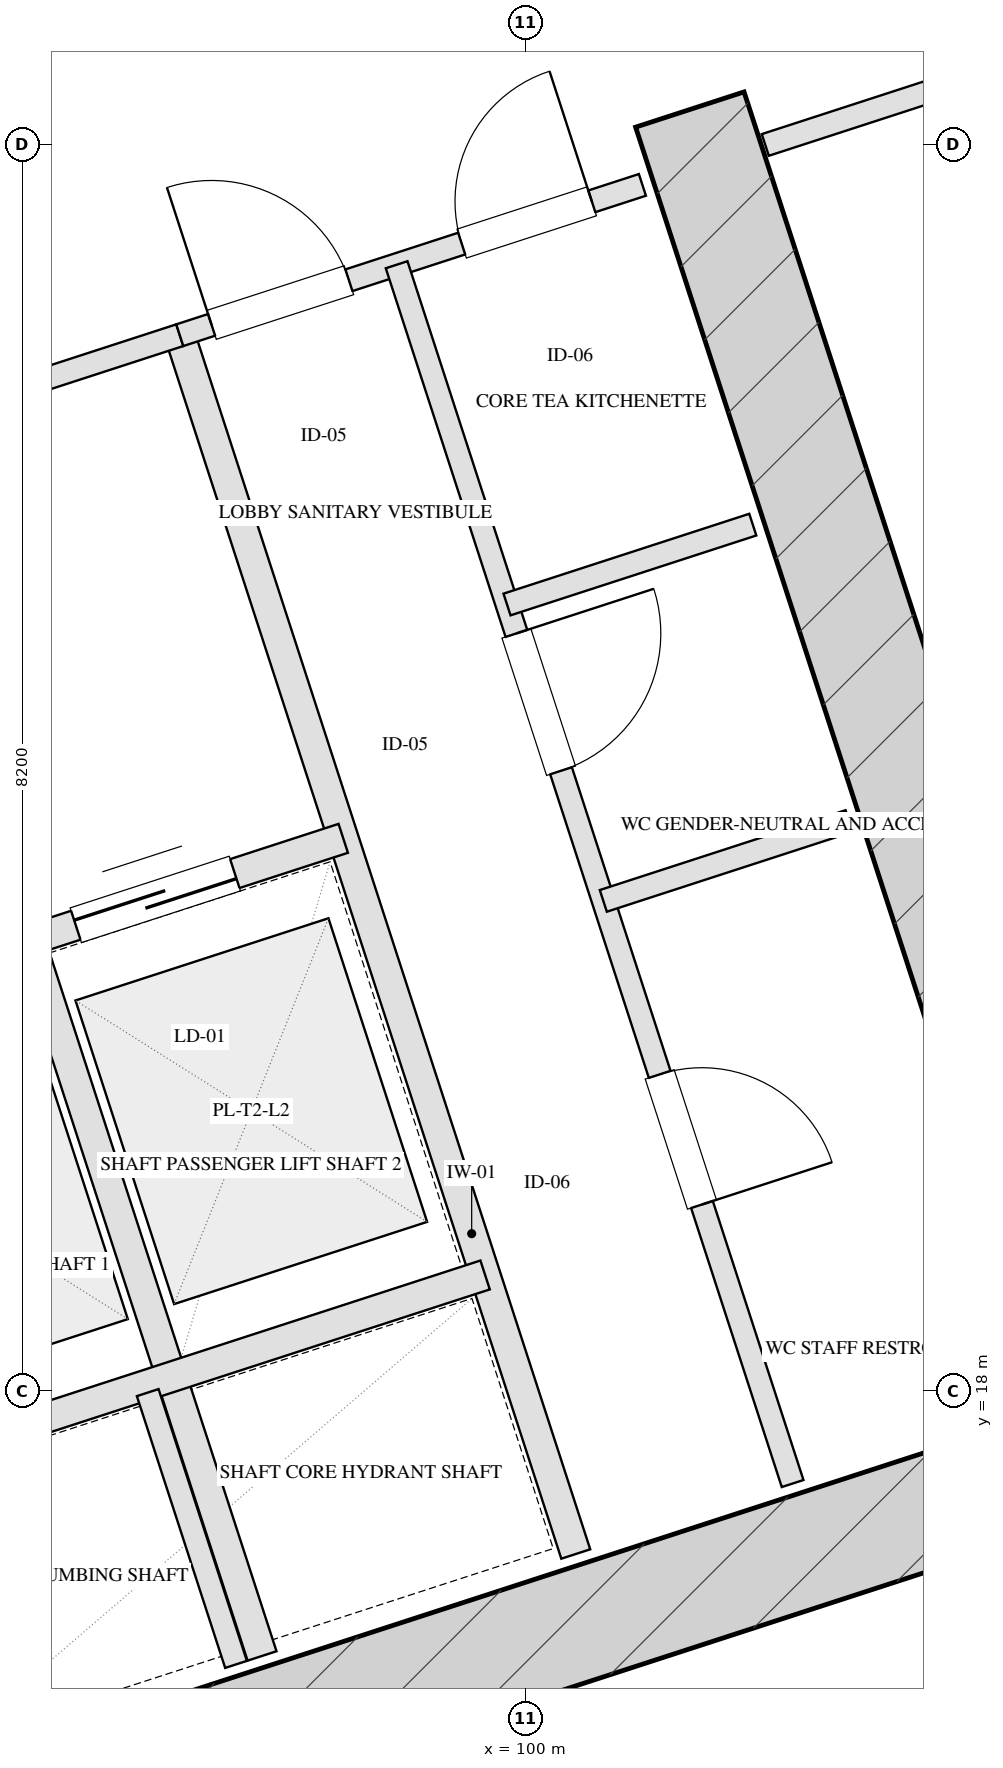
"""IFC4 building model, lengths in metres.
Left out: names, types, materials, properties, quantities, classifications, styles, units other than length and angle.
Written with IfcOpenShell. Run it as: python <this file> out.ifc"""

import sys

from ifc_helpers import new_model, si_unit, direction, frame, frame_2d, origin, place, context, subcontext, project, spatial, rectangle, extrude, element, fill, save


model = new_model("IFC4")
c1 = context("Model", 3, precision=1e-05, world=origin(), true_north=direction((0.0, 1.0)))
c2 = subcontext(c1, "Body", "Model", "MODEL_VIEW")
j1 = project(units=[si_unit("LENGTHUNIT", "METRE"), si_unit("PLANEANGLEUNIT", "RADIAN")], contexts=[c1])
p1 = place(None, origin())
s1 = spatial("IfcSite", under=j1, at=p1, CompositionType="ELEMENT")
p2 = place(p1, origin())
s2 = spatial("IfcBuilding", under=s1, at=p2, CompositionType="ELEMENT")
p3 = place(p2, frame((0.0, 0.0, 26.0)))
s3 = spatial("IfcBuildingStorey", under=s2, at=p3, CompositionType="ELEMENT", Elevation=26.0)
p4 = place(p3, frame((88.559, 12.629, 0.0), z_axis=(0.0, 0.0, 1.0), x_axis=(0.951056072937, 0.309018358888, 0.0)))
e1 = element("IfcWall", 1, at=p4, inside=s3, PredefinedType="SHEAR", context=c2, shape_type="SweptSolid", body=[
    extrude(rectangle(XDim=16.55, YDim=0.75, at=frame_2d((8.275, 0.0))), origin(), (0.0, 0.0, 1.0), 4.0),
])
p5 = place(p3, frame((101.082, 26.429, 0.0), z_axis=(0.0, 0.0, 1.0), x_axis=(0.309016134813, -0.951056795583, 0.0)))
e2 = element("IfcWall", 2, at=p5, inside=s3, PredefinedType="SHEAR", context=c2, shape_type="SweptSolid", body=[
    extrude(rectangle(XDim=9.63, YDim=0.75, at=frame_2d((4.815, 0.0))), origin(), (0.0, 0.0, 1.0), 4.0),
])
p6 = place(p3, frame((100.345, 63.648, 0.0), z_axis=(0.0, 0.0, 1.0), x_axis=(0.309014526607, -0.951057318118, 0.0)))
e3 = element("IfcWall", 3, at=p6, inside=s3, PredefinedType="SOLIDWALL", context=c2, shape_type="SweptSolid", body=[
    extrude(rectangle(XDim=50.0, YDim=0.4, at=frame_2d((25.0, 0.0))), origin(), (0.0, 0.0, 1.0), 3.16),
])
p7 = place(p6, frame((30.15, 0.0, 0.75)))
e4 = element("IfcOpeningElement", 4, at=p7, cuts=e3, PredefinedType="OPENING", context=c2, shape_type="SweptSolid", body=[
    extrude(rectangle(XDim=2.5, YDim=1.75, at=frame_2d((1.25, 0.875))), frame((0.0, 0.21, 0.0), z_axis=(0.0, -1.0, 0.0), x_axis=(1.0, 0.0, 0.0)), (0.0, 0.0, 1.0), 0.42),
])
p8 = place(p6, frame((21.15, 0.0, 0.75)))
e5 = element("IfcOpeningElement", 5, at=p8, cuts=e3, PredefinedType="OPENING", context=c2, shape_type="SweptSolid", body=[
    extrude(rectangle(XDim=2.5, YDim=1.75, at=frame_2d((1.25, 0.875))), frame((0.0, 0.21, 0.0), z_axis=(0.0, -1.0, 0.0), x_axis=(1.0, 0.0, 0.0)), (0.0, 0.0, 1.0), 0.42),
])
p9 = place(p3, frame((97.727, 24.944, 0.0), z_axis=(0.0, 0.0, 1.0), x_axis=(0.309016001439, -0.951056838919, 0.0)))
e6 = element("IfcWall", 6, at=p9, inside=s3, PredefinedType="PARTITIONING", context=c2, shape_type="SweptSolid", body=[
    extrude(rectangle(XDim=8.43, YDim=0.2, at=frame_2d((4.215, 0.0))), origin(), (0.0, 0.0, 1.0), 3.725),
])
p10 = place(p3, frame((93.542, 23.585, 0.0), z_axis=(0.0, 0.0, 1.0), x_axis=(0.951063829732, 0.308994485023, 0.0)))
e7 = element("IfcWall", 7, at=p10, inside=s3, PredefinedType="PARTITIONING", context=c2, shape_type="SweptSolid", body=[
    extrude(rectangle(XDim=4.4, YDim=0.15, at=frame_2d((2.2, 0.0))), origin(), (0.0, 0.0, 1.0), 3.725),
])
p11 = place(p10, frame((1.45, 0.0, 0.0)))
e8 = element("IfcOpeningElement", 8, at=p11, cuts=e7, PredefinedType="OPENING", context=c2, shape_type="SweptSolid", body=[
    extrude(rectangle(XDim=1.5, YDim=2.05, at=frame_2d((0.75, 1.025))), frame((0.0, 0.085, 0.0), z_axis=(0.0, -1.0, 0.0), x_axis=(1.0, 0.0, 0.0)), (0.0, 0.0, 1.0), 0.17),
])
p12 = place(p3, frame((94.617, 20.275, 0.0), z_axis=(0.0, 0.0, 1.0), x_axis=(0.951058531764, 0.30901079133, 0.0)))
e9 = element("IfcWall", 9, at=p12, inside=s3, PredefinedType="PARTITIONING", context=c2, shape_type="SweptSolid", body=[
    extrude(rectangle(XDim=4.4, YDim=0.2, at=frame_2d((2.2, 0.0))), origin(), (0.0, 0.0, 1.0), 3.725),
])
p13 = place(p12, frame((0.45, 0.0, 0.0)))
e10 = element("IfcOpeningElement", 10, at=p13, cuts=e9, PredefinedType="OPENING", context=c2, shape_type="SweptSolid", body=[
    extrude(rectangle(XDim=1.1, YDim=2.05, at=frame_2d((0.55, 1.025))), frame((0.0, 0.11, 0.0), z_axis=(0.0, -1.0, 0.0), x_axis=(1.0, 0.0, 0.0)), (0.0, 0.0, 1.0), 0.22),
])
p14 = place(p12, frame((2.55, 0.0, 0.0)))
e11 = element("IfcOpeningElement", 11, at=p14, cuts=e9, PredefinedType="OPENING", context=c2, shape_type="SweptSolid", body=[
    extrude(rectangle(XDim=1.1, YDim=2.05, at=frame_2d((0.55, 1.025))), frame((0.0, 0.11, 0.0), z_axis=(0.0, -1.0, 0.0), x_axis=(1.0, 0.0, 0.0)), (0.0, 0.0, 1.0), 0.22),
])
p15 = place(p3, frame((96.738, 20.964, 0.0), z_axis=(0.0, 0.0, 1.0), x_axis=(0.309042578481, -0.951048203135, 0.0)))
e12 = element("IfcWall", 12, at=p15, inside=s3, PredefinedType="PARTITIONING", context=c2, shape_type="SweptSolid", body=[
    extrude(rectangle(XDim=4.95, YDim=0.2, at=frame_2d((2.475, 0.0))), origin(), (0.0, 0.0, 1.0), 3.725),
])
p16 = place(p3, frame((95.551, 17.403, 0.0), z_axis=(0.0, 0.0, 1.0), x_axis=(0.951058531764, 0.30901079133, 0.0)))
e13 = element("IfcWall", 13, at=p16, inside=s3, PredefinedType="PARTITIONING", context=c2, shape_type="SweptSolid", body=[
    extrude(rectangle(XDim=4.4, YDim=0.2, at=frame_2d((2.2, 0.0))), origin(), (0.0, 0.0, 1.0), 3.725),
])
p17 = place(p3, frame((97.516, 17.989, 0.0), z_axis=(0.0, 0.0, 1.0), x_axis=(0.30897153969, -0.951071284217, 0.0)))
e14 = element("IfcWall", 14, at=p17, inside=s3, PredefinedType="PARTITIONING", context=c2, shape_type="SweptSolid", body=[
    extrude(rectangle(XDim=1.88, YDim=0.15, at=frame_2d((0.94, 0.0))), origin(), (0.0, 0.0, 1.0), 3.725),
])
p18 = place(p3, frame((97.727, 24.944, 0.0), z_axis=(0.0, 0.0, 1.0), x_axis=(0.951036872128, 0.309077446369, 0.0)))
e15 = element("IfcWall", 15, at=p18, inside=s3, PredefinedType="PARTITIONING", context=c2, shape_type="SweptSolid", body=[
    extrude(rectangle(XDim=3.2, YDim=0.15, at=frame_2d((1.6, 0.0))), origin(), (0.0, 0.0, 1.0), 3.725),
])
p19 = place(p18, frame((0.22, 0.0, 0.0)))
e16 = element("IfcOpeningElement", 16, at=p19, cuts=e15, PredefinedType="OPENING", context=c2, shape_type="SweptSolid", body=[
    extrude(rectangle(XDim=0.95, YDim=2.05, at=frame_2d((0.475, 1.025))), frame((0.0, 0.085, 0.0), z_axis=(0.0, -1.0, 0.0), x_axis=(1.0, 0.0, 0.0)), (0.0, 0.0, 1.0), 0.17),
])
p20 = place(p18, frame((1.95, 0.0, 0.0)))
e17 = element("IfcOpeningElement", 17, at=p20, cuts=e15, PredefinedType="OPENING", context=c2, shape_type="SweptSolid", body=[
    extrude(rectangle(XDim=0.9, YDim=2.05, at=frame_2d((0.45, 1.025))), frame((0.0, 0.085, 0.0), z_axis=(0.0, -1.0, 0.0), x_axis=(1.0, 0.0, 0.0)), (0.0, 0.0, 1.0), 0.17),
])
p21 = place(p3, frame((99.153, 25.408, 0.0), z_axis=(0.0, 0.0, 1.0), x_axis=(0.309016001439, -0.951056838919, 0.0)))
e18 = element("IfcWall", 18, at=p21, inside=s3, PredefinedType="PARTITIONING", context=c2, shape_type="SweptSolid", body=[
    extrude(rectangle(XDim=8.43, YDim=0.15, at=frame_2d((4.215, 0.0))), origin(), (0.0, 0.0, 1.0), 3.725),
])
p22 = place(p21, frame((2.55, 0.0, 0.0)))
e19 = element("IfcOpeningElement", 19, at=p22, cuts=e18, PredefinedType="OPENING", context=c2, shape_type="SweptSolid", body=[
    extrude(rectangle(XDim=0.95, YDim=2.05, at=frame_2d((0.475, 1.025))), frame((0.0, 0.085, 0.0), z_axis=(0.0, -1.0, 0.0), x_axis=(1.0, 0.0, 0.0)), (0.0, 0.0, 1.0), 0.17),
])
p23 = place(p21, frame((5.6, 0.0, 0.0)))
e20 = element("IfcOpeningElement", 20, at=p23, cuts=e18, PredefinedType="OPENING", context=c2, shape_type="SweptSolid", body=[
    extrude(rectangle(XDim=0.9, YDim=2.05, at=frame_2d((0.45, 1.025))), frame((0.0, 0.085, 0.0), z_axis=(0.0, -1.0, 0.0), x_axis=(1.0, 0.0, 0.0)), (0.0, 0.0, 1.0), 0.17),
])
for number, where, z_axis, x_axis in (
    (21, (100.513, 21.223, 0.0), (0.0, 0.0, 1.0), (0.951, 0.309, 0.0)),
    (22, (99.879, 23.173, 0.0), (0.0, 0.0, 1.0), (0.951, 0.309, 0.0)),
):
    element("IfcWall", number, at=place(p3, frame(where, z_axis=z_axis, x_axis=x_axis)), inside=s3, PredefinedType="PARTITIONING", context=c2, shape_type="SweptSolid", body=[
        extrude(rectangle(XDim=1.7, YDim=0.15, at=frame_2d((0.85, 0.0))), origin(), (0.0, 0.0, 1.0), 3.725),
    ])
p24 = place(p3, frame((101.578, 26.196, 0.0), z_axis=(0.0, 0.0, 1.0), x_axis=(0.951059043131, 0.309009217467, 0.0)))
e23 = element("IfcWall", 23, at=p24, inside=s3, PredefinedType="PARTITIONING", context=c2, shape_type="SweptSolid", body=[
    extrude(rectangle(XDim=10.2, YDim=0.15, at=frame_2d((5.1, 0.0))), origin(), (0.0, 0.0, 1.0), 3.725),
])
p25 = place(p24, frame((4.284, 0.0, 0.0)))
e24 = element("IfcOpeningElement", 24, at=p25, cuts=e23, PredefinedType="OPENING", context=c2, shape_type="SweptSolid", body=[
    extrude(rectangle(XDim=1.0, YDim=2.05, at=frame_2d((0.5, 1.025))), frame((0.0, 0.085, 0.0), z_axis=(0.0, -1.0, 0.0), x_axis=(1.0, 0.0, 0.0)), (0.0, 0.0, 1.0), 0.17),
])
p26 = place(p3, frame((91.834, 25.848, 0.0), z_axis=(0.0, 0.0, 1.0), x_axis=(0.951055605195, 0.309019798438, 0.0)))
e25 = element("IfcWall", 25, at=p26, inside=s3, PredefinedType="PARTITIONING", context=c2, shape_type="SweptSolid", body=[
    extrude(rectangle(XDim=19.575, YDim=0.15, at=frame_2d((9.788, 0.0))), origin(), (0.0, 0.0, 1.0), 3.725),
])
p27 = place(p14, origin())
e26 = element("IfcDoor", 26, at=p27, inside=s3, OperationType="DOUBLE_DOOR_SLIDING", PredefinedType="DOOR", context=c2, shape_type="SweptSolid", body=[
    extrude(rectangle(XDim=1.1, YDim=2.05, at=frame_2d((0.55, 1.025))), frame((0.0, 0.025, 0.0), z_axis=(0.0, -1.0, 0.0), x_axis=(1.0, 0.0, 0.0)), (0.0, 0.0, 1.0), 0.05),
])
fill(e11, e26)
p28 = place(p19, origin())
e27 = element("IfcDoor", 27, at=p28, inside=s3, OperationType="SINGLE_SWING_LEFT", PredefinedType="DOOR", context=c2, shape_type="SweptSolid", body=[
    extrude(rectangle(XDim=0.95, YDim=2.05, at=frame_2d((0.475, 1.025))), frame((0.0, 0.025, 0.0), z_axis=(0.0, -1.0, 0.0), x_axis=(1.0, 0.0, 0.0)), (0.0, 0.0, 1.0), 0.05),
])
fill(e16, e27)
p29 = place(p20, origin())
e28 = element("IfcDoor", 28, at=p29, inside=s3, OperationType="SINGLE_SWING_RIGHT", PredefinedType="DOOR", context=c2, shape_type="SweptSolid", body=[
    extrude(rectangle(XDim=0.9, YDim=2.05, at=frame_2d((0.45, 1.025))), frame((0.0, 0.025, 0.0), z_axis=(0.0, -1.0, 0.0), x_axis=(1.0, 0.0, 0.0)), (0.0, 0.0, 1.0), 0.05),
])
fill(e17, e28)
p30 = place(p22, origin())
e29 = element("IfcDoor", 29, at=p30, inside=s3, OperationType="SINGLE_SWING_LEFT", PredefinedType="DOOR", context=c2, shape_type="SweptSolid", body=[
    extrude(rectangle(XDim=0.95, YDim=2.05, at=frame_2d((0.475, 1.025))), frame((0.0, 0.025, 0.0), z_axis=(0.0, -1.0, 0.0), x_axis=(1.0, 0.0, 0.0)), (0.0, 0.0, 1.0), 0.05),
])
fill(e19, e29)
p31 = place(p23, origin())
e30 = element("IfcDoor", 30, at=p31, inside=s3, OperationType="SINGLE_SWING_RIGHT", PredefinedType="DOOR", context=c2, shape_type="SweptSolid", body=[
    extrude(rectangle(XDim=0.9, YDim=2.05, at=frame_2d((0.45, 1.025))), frame((0.0, 0.025, 0.0), z_axis=(0.0, -1.0, 0.0), x_axis=(1.0, 0.0, 0.0)), (0.0, 0.0, 1.0), 0.05),
])
fill(e20, e30)
save(model, sys.argv[1])
